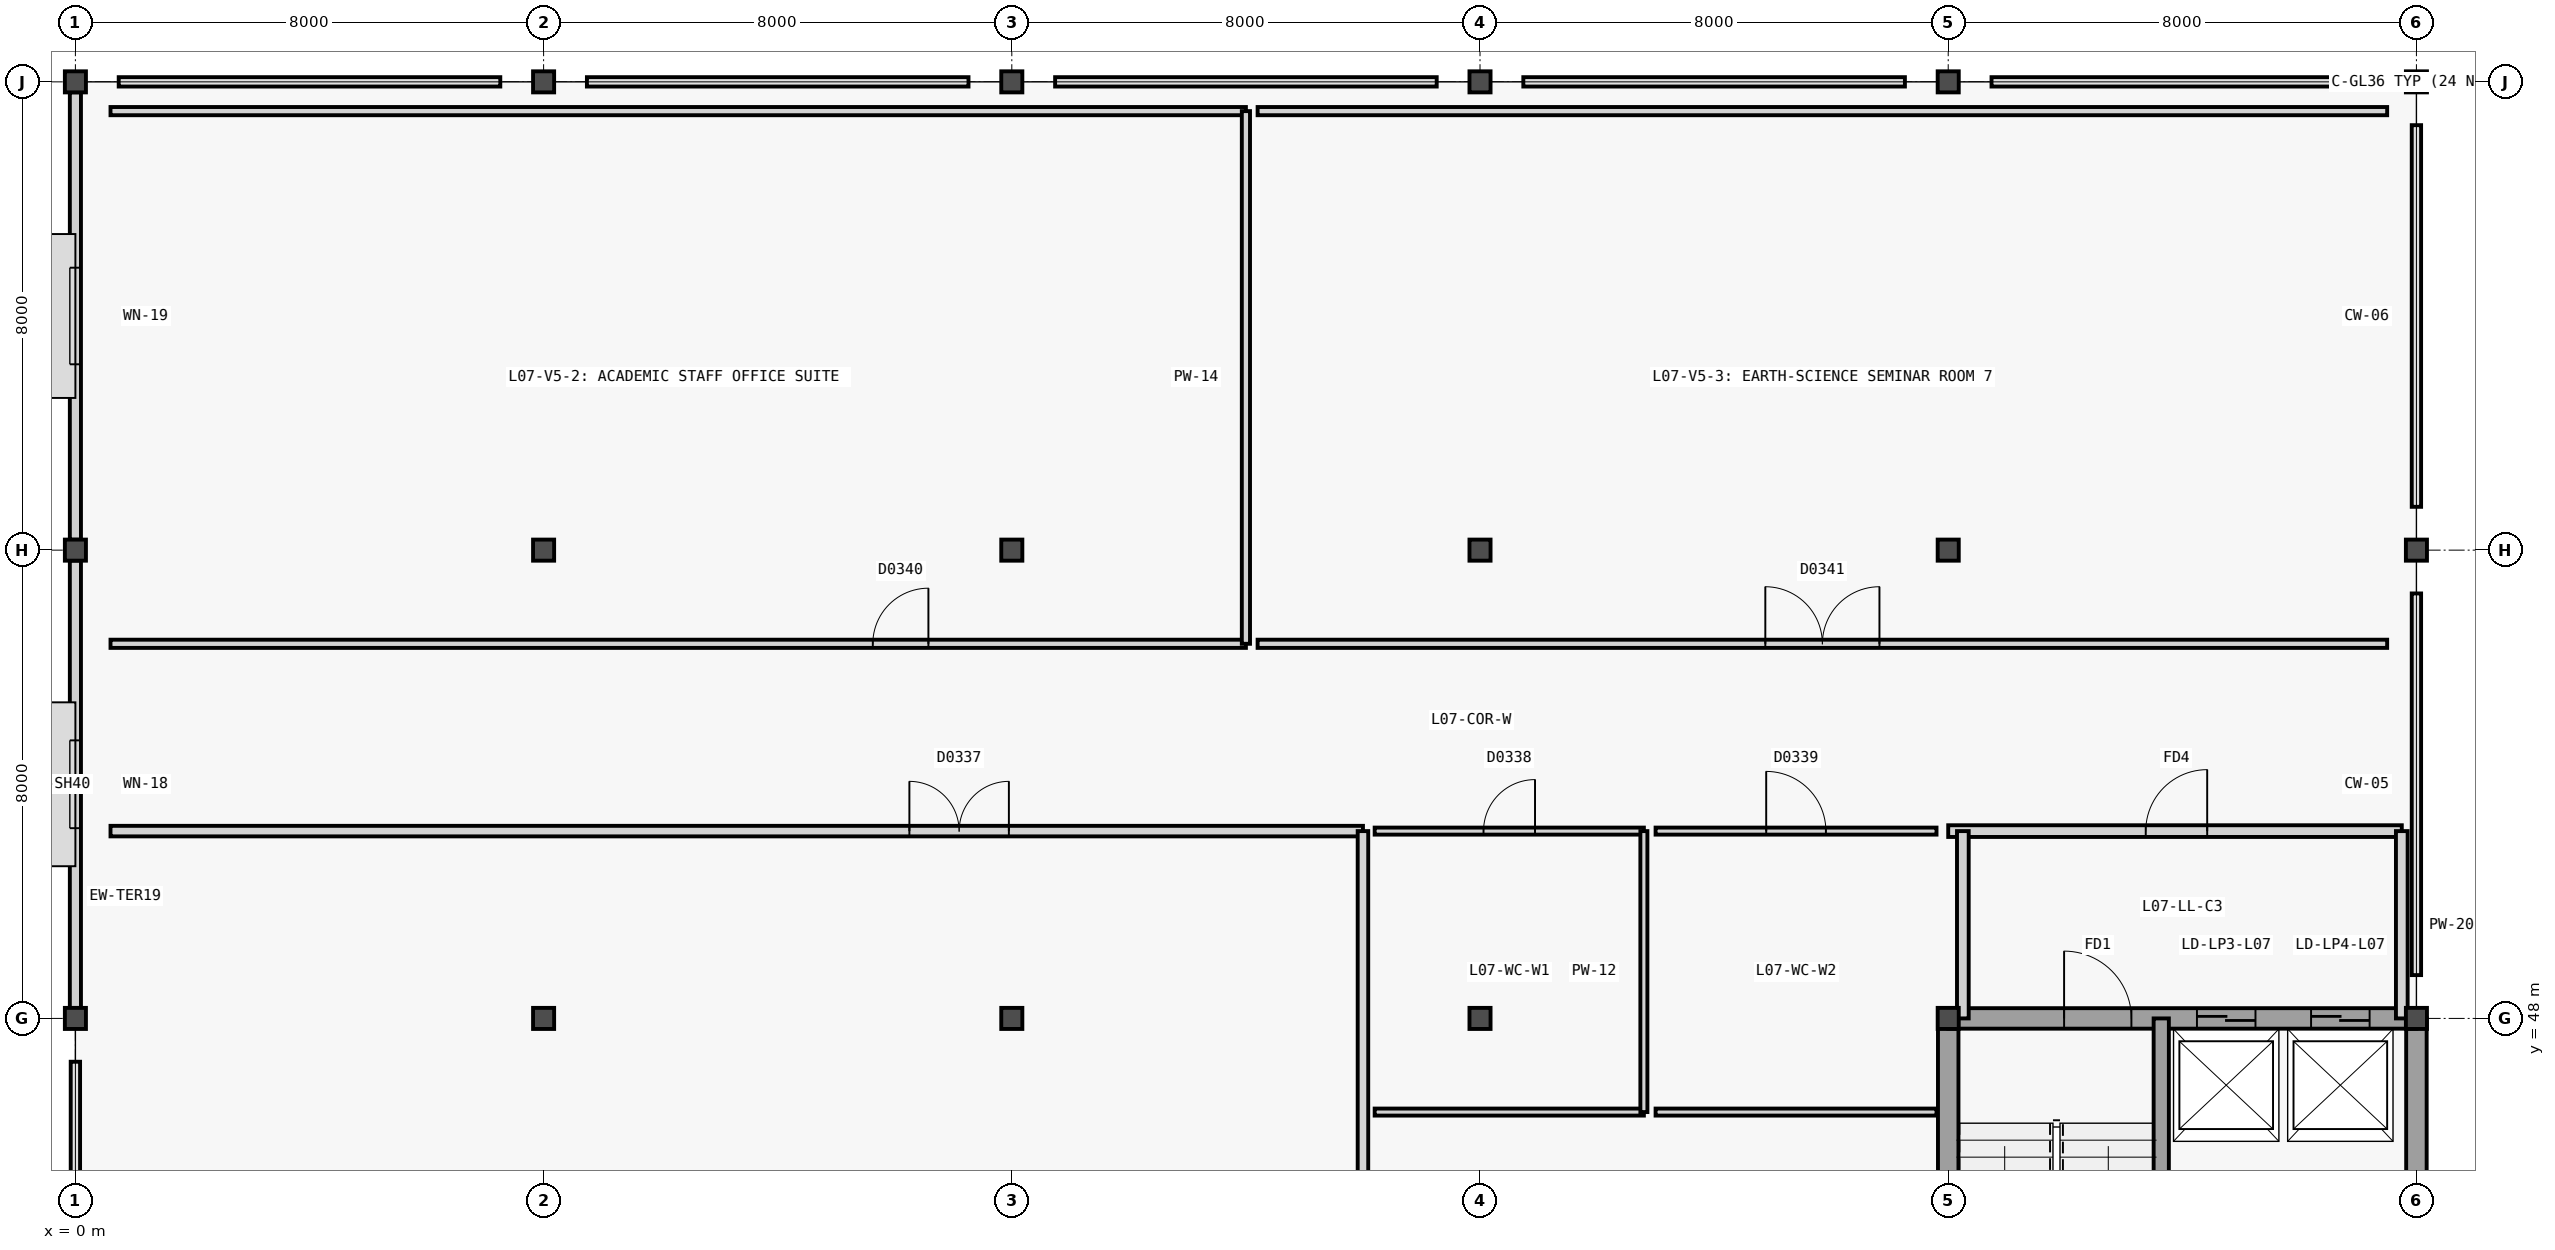
"""IFC4 building model, lengths in metres.
Left out: names, types, materials, properties, quantities, classifications, styles, units other than length and angle.
Written with IfcOpenShell. Run it as: python <this file> out.ifc"""

import sys

from ifc_helpers import new_model, si_unit, direction, frame, frame_2d, origin, origin_2d, place, context, subcontext, project, spatial, rectangle, extrude, element, fill, save


model = new_model("IFC4")
c1 = context("Model", 3, precision=1e-05, world=origin(), true_north=direction((0.0, 1.0)))
c2 = subcontext(c1, "Body", "Model", "MODEL_VIEW")
j1 = project(units=[si_unit("LENGTHUNIT", "METRE"), si_unit("PLANEANGLEUNIT", "RADIAN")], contexts=[c1])
p1 = place(None, origin())
s1 = spatial("IfcSite", under=j1, at=p1, CompositionType="ELEMENT")
p2 = place(p1, origin())
s2 = spatial("IfcBuilding", under=s1, at=p2, CompositionType="ELEMENT")
p3 = place(p2, frame((0.0, 0.0, 28.8)))
s3 = spatial("IfcBuildingStorey", under=s2, at=p3, CompositionType="ELEMENT", Elevation=28.8)
for number, where, z_axis, x_axis in (
    (1, (0.0, 48.0, 0.0), (0.0, 0.0, 1.0), (1.0, 0.0, 0.0)),
    (2, (0.0, 56.0, 0.0), (0.0, 0.0, 1.0), (1.0, 0.0, 0.0)),
    (3, (0.0, 64.0, 0.0), (0.0, 0.0, 1.0), (1.0, 0.0, 0.0)),
    (4, (8.0, 48.0, 0.0), (0.0, 0.0, 1.0), (1.0, 0.0, 0.0)),
    (5, (8.0, 56.0, 0.0), (0.0, 0.0, 1.0), (1.0, 0.0, 0.0)),
    (6, (8.0, 64.0, 0.0), (0.0, 0.0, 1.0), (1.0, 0.0, 0.0)),
    (7, (16.0, 48.0, 0.0), (0.0, 0.0, 1.0), (1.0, 0.0, 0.0)),
    (8, (16.0, 56.0, 0.0), (0.0, 0.0, 1.0), (1.0, 0.0, 0.0)),
    (9, (16.0, 64.0, 0.0), (0.0, 0.0, 1.0), (1.0, 0.0, 0.0)),
    (10, (24.0, 48.0, 0.0), (0.0, 0.0, 1.0), (1.0, 0.0, 0.0)),
    (11, (24.0, 56.0, 0.0), (0.0, 0.0, 1.0), (1.0, 0.0, 0.0)),
    (12, (24.0, 64.0, 0.0), (0.0, 0.0, 1.0), (1.0, 0.0, 0.0)),
    (13, (32.0, 48.0, 0.0), (0.0, 0.0, 1.0), (1.0, 0.0, 0.0)),
    (14, (32.0, 56.0, 0.0), (0.0, 0.0, 1.0), (1.0, 0.0, 0.0)),
    (15, (32.0, 64.0, 0.0), (0.0, 0.0, 1.0), (1.0, 0.0, 0.0)),
    (16, (40.0, 48.0, 0.0), (0.0, 0.0, 1.0), (1.0, 0.0, 0.0)),
    (17, (40.0, 56.0, 0.0), (0.0, 0.0, 1.0), (1.0, 0.0, 0.0)),
    (18, (40.0, 64.0, 0.0), (0.0, 0.0, 1.0), (1.0, 0.0, 0.0)),
):
    element("IfcColumn", number, at=place(p3, frame(where, z_axis=z_axis, x_axis=x_axis)), inside=s3, PredefinedType="COLUMN", context=c2, shape_type="SweptSolid", body=[
        extrude(rectangle(XDim=0.36, YDim=0.36, at=origin_2d()), origin(), (0.0, 0.0, 1.0), 3.34),
    ])
p4 = place(p3, frame((0.0, 48.178, 0.0), z_axis=(0.0, 0.0, 1.0), x_axis=(0.0, 1.0, 0.0)))
e19 = element("IfcWall", 19, at=p4, inside=s3, PredefinedType="SOLIDWALL", context=c2, shape_type="SweptSolid", body=[
    extrude(rectangle(XDim=7.644, YDim=0.19, at=frame_2d((3.822, 0.0))), origin(), (0.0, 0.0, 1.0), 2.74),
])
p5 = place(p4, frame((3.072, 0.0, 0.88)))
e20 = element("IfcOpeningElement", 20, at=p5, cuts=e19, PredefinedType="OPENING", context=c2, shape_type="SweptSolid", body=[
    extrude(rectangle(XDim=1.5, YDim=1.5, at=frame_2d((0.75, 0.75))), frame((0.0, 0.105, 0.0), z_axis=(0.0, -1.0, 0.0), x_axis=(1.0, 0.0, 0.0)), (0.0, 0.0, 1.0), 0.21),
])
p6 = place(p3, frame((0.0, 56.178, 0.0), z_axis=(0.0, 0.0, 1.0), x_axis=(0.0, 1.0, 0.0)))
e21 = element("IfcWall", 21, at=p6, inside=s3, PredefinedType="SOLIDWALL", context=c2, shape_type="SweptSolid", body=[
    extrude(rectangle(XDim=7.644, YDim=0.19, at=frame_2d((3.822, 0.0))), origin(), (0.0, 0.0, 1.0), 2.74),
])
p7 = place(p6, frame((2.997, 0.0, 0.88)))
e22 = element("IfcOpeningElement", 22, at=p7, cuts=e21, PredefinedType="OPENING", context=c2, shape_type="SweptSolid", body=[
    extrude(rectangle(XDim=1.65, YDim=1.5, at=frame_2d((0.825, 0.75))), frame((0.0, 0.105, 0.0), z_axis=(0.0, -1.0, 0.0), x_axis=(1.0, 0.0, 0.0)), (0.0, 0.0, 1.0), 0.21),
])
for number, where, z_axis, x_axis in (
    (23, (32.0, 40.0, 0.0), (0.0, 0.0, 1.0), (0.0, 1.0, 0.0)),
    (24, (40.0, 40.0, 0.0), (0.0, 0.0, 1.0), (0.0, 1.0, 0.0)),
):
    element("IfcWall", number, at=place(p3, frame(where, z_axis=z_axis, x_axis=x_axis)), inside=s3, PredefinedType="SHEAR", context=c2, shape_type="SweptSolid", body=[
        extrude(rectangle(XDim=8.0, YDim=0.35, at=frame_2d((4.0, 0.0))), origin(), (0.0, 0.0, 1.0), 3.6),
    ])
p8 = place(p3, frame((32.0, 48.0, 0.0), z_axis=(0.0, 0.0, 1.0), x_axis=(1.0, 0.0, 0.0)))
e25 = element("IfcWall", 25, at=p8, inside=s3, PredefinedType="SHEAR", context=c2, shape_type="SweptSolid", body=[
    extrude(rectangle(XDim=8.0, YDim=0.35, at=frame_2d((4.0, 0.0))), origin(), (0.0, 0.0, 1.0), 3.6),
])
p9 = place(p8, frame((1.98, 0.0, 0.0)))
e26 = element("IfcOpeningElement", 26, at=p9, cuts=e25, PredefinedType="OPENING", context=c2, shape_type="SweptSolid", body=[
    extrude(rectangle(XDim=1.15, YDim=2.2, at=frame_2d((0.575, 1.1))), frame((0.0, 0.185, 0.0), z_axis=(0.0, -1.0, 0.0), x_axis=(1.0, 0.0, 0.0)), (0.0, 0.0, 1.0), 0.37),
])
p10 = place(p8, frame((4.25, 0.0, 0.0)))
e27 = element("IfcOpeningElement", 27, at=p10, cuts=e25, PredefinedType="OPENING", context=c2, shape_type="SweptSolid", body=[
    extrude(rectangle(XDim=1.0, YDim=2.15, at=frame_2d((0.5, 1.075))), frame((0.0, 0.185, 0.0), z_axis=(0.0, -1.0, 0.0), x_axis=(1.0, 0.0, 0.0)), (0.0, 0.0, 1.0), 0.37),
])
p11 = place(p8, frame((6.2, 0.0, 0.0)))
e28 = element("IfcOpeningElement", 28, at=p11, cuts=e25, PredefinedType="OPENING", context=c2, shape_type="SweptSolid", body=[
    extrude(rectangle(XDim=1.0, YDim=2.15, at=frame_2d((0.5, 1.075))), frame((0.0, 0.185, 0.0), z_axis=(0.0, -1.0, 0.0), x_axis=(1.0, 0.0, 0.0)), (0.0, 0.0, 1.0), 0.37),
])
p12 = place(p3, frame((35.64, 40.0, 0.0), z_axis=(0.0, 0.0, 1.0), x_axis=(0.0, 1.0, 0.0)))
e29 = element("IfcWall", 29, at=p12, inside=s3, PredefinedType="SHEAR", context=c2, shape_type="SweptSolid", body=[
    extrude(rectangle(XDim=8.0, YDim=0.26, at=frame_2d((4.0, 0.0))), origin(), (0.0, 0.0, 1.0), 3.6),
])
p13 = place(p3, frame((32.0, 51.2, 0.0), z_axis=(0.0, 0.0, 1.0), x_axis=(1.0, 0.0, 0.0)))
e30 = element("IfcWall", 30, at=p13, inside=s3, PredefinedType="PARTITIONING", context=c2, shape_type="SweptSolid", body=[
    extrude(rectangle(XDim=7.75, YDim=0.2, at=frame_2d((3.875, 0.0))), origin(), (0.0, 0.0, 1.0), 3.32),
])
p14 = place(p13, frame((3.375, 0.0, 0.0)))
e31 = element("IfcOpeningElement", 31, at=p14, cuts=e30, PredefinedType="OPENING", context=c2, shape_type="SweptSolid", body=[
    extrude(rectangle(XDim=1.05, YDim=2.15, at=frame_2d((0.525, 1.075))), frame((0.0, 0.11, 0.0), z_axis=(0.0, -1.0, 0.0), x_axis=(1.0, 0.0, 0.0)), (0.0, 0.0, 1.0), 0.22),
])
p15 = place(p3, frame((39.75, 48.0, 0.0), z_axis=(0.0, 0.0, 1.0), x_axis=(0.0, 1.0, 0.0)))
e32 = element("IfcWall", 32, at=p15, inside=s3, PredefinedType="PARTITIONING", context=c2, shape_type="SweptSolid", body=[
    extrude(rectangle(XDim=3.2, YDim=0.2, at=frame_2d((1.6, 0.0))), origin(), (0.0, 0.0, 1.0), 2.74),
])
p16 = place(p3, frame((32.25, 48.0, 0.0), z_axis=(0.0, 0.0, 1.0), x_axis=(0.0, 1.0, 0.0)))
e33 = element("IfcWall", 33, at=p16, inside=s3, PredefinedType="PARTITIONING", context=c2, shape_type="SweptSolid", body=[
    extrude(rectangle(XDim=3.2, YDim=0.2, at=frame_2d((1.6, 0.0))), origin(), (0.0, 0.0, 1.0), 2.78),
])
p17 = place(p3, frame((0.6, 51.2, 0.0), z_axis=(0.0, 0.0, 1.0), x_axis=(1.0, 0.0, 0.0)))
e34 = element("IfcWall", 34, at=p17, inside=s3, PredefinedType="PARTITIONING", context=c2, shape_type="SweptSolid", body=[
    extrude(rectangle(XDim=21.4, YDim=0.18, at=frame_2d((10.7, 0.0))), origin(), (0.0, 0.0, 1.0), 3.34),
])
p18 = place(p17, frame((13.65, 0.0, 0.0)))
e35 = element("IfcOpeningElement", 35, at=p18, cuts=e34, PredefinedType="OPENING", context=c2, shape_type="SweptSolid", body=[
    extrude(rectangle(XDim=1.7, YDim=2.25, at=frame_2d((0.85, 1.125))), frame((0.0, 0.1, 0.0), z_axis=(0.0, -1.0, 0.0), x_axis=(1.0, 0.0, 0.0)), (0.0, 0.0, 1.0), 0.2),
])
p19 = place(p3, frame((22.0, 33.8, 0.0), z_axis=(0.0, 0.0, 1.0), x_axis=(0.0, 1.0, 0.0)))
e36 = element("IfcWall", 36, at=p19, inside=s3, PredefinedType="PARTITIONING", context=c2, shape_type="SweptSolid", body=[
    extrude(rectangle(XDim=17.4, YDim=0.18, at=frame_2d((8.7, 0.0))), origin(), (0.0, 0.0, 1.0), 3.34),
])
p20 = place(p3, frame((22.2, 46.4, 0.0), z_axis=(0.0, 0.0, 1.0), x_axis=(1.0, 0.0, 0.0)))
e37 = element("IfcWall", 37, at=p20, inside=s3, PredefinedType="PARTITIONING", context=c2, shape_type="SweptSolid", body=[
    extrude(rectangle(XDim=4.6, YDim=0.12, at=frame_2d((2.3, 0.0))), origin(), (0.0, 0.0, 1.0), 3.34),
])
p21 = place(p3, frame((22.2, 51.2, 0.0), z_axis=(0.0, 0.0, 1.0), x_axis=(1.0, 0.0, 0.0)))
e38 = element("IfcWall", 38, at=p21, inside=s3, PredefinedType="PARTITIONING", context=c2, shape_type="SweptSolid", body=[
    extrude(rectangle(XDim=4.6, YDim=0.12, at=frame_2d((2.3, 0.0))), origin(), (0.0, 0.0, 1.0), 3.34),
])
p22 = place(p21, frame((1.86, 0.0, 0.0)))
e39 = element("IfcOpeningElement", 39, at=p22, cuts=e38, PredefinedType="OPENING", context=c2, shape_type="SweptSolid", body=[
    extrude(rectangle(XDim=0.88, YDim=2.1, at=frame_2d((0.44, 1.05))), frame((0.0, 0.07, 0.0), z_axis=(0.0, -1.0, 0.0), x_axis=(1.0, 0.0, 0.0)), (0.0, 0.0, 1.0), 0.14),
])
for number, where, z_axis, x_axis in (
    (40, (26.8, 46.4, 0.0), (0.0, 0.0, 1.0), (0.0, 1.0, 0.0)),
    (41, (27.0, 46.4, 0.0), (0.0, 0.0, 1.0), (1.0, 0.0, 0.0)),
):
    element("IfcWall", number, at=place(p3, frame(where, z_axis=z_axis, x_axis=x_axis)), inside=s3, PredefinedType="PARTITIONING", context=c2, shape_type="SweptSolid", body=[
        extrude(rectangle(XDim=4.8, YDim=0.12, at=frame_2d((2.4, 0.0))), origin(), (0.0, 0.0, 1.0), 3.34),
    ])
p23 = place(p3, frame((27.0, 51.2, 0.0), z_axis=(0.0, 0.0, 1.0), x_axis=(1.0, 0.0, 0.0)))
e42 = element("IfcWall", 42, at=p23, inside=s3, PredefinedType="PARTITIONING", context=c2, shape_type="SweptSolid", body=[
    extrude(rectangle(XDim=4.8, YDim=0.12, at=frame_2d((2.4, 0.0))), origin(), (0.0, 0.0, 1.0), 3.34),
])
p24 = place(p23, frame((1.89, 0.0, 0.0)))
e43 = element("IfcOpeningElement", 43, at=p24, cuts=e42, PredefinedType="OPENING", context=c2, shape_type="SweptSolid", body=[
    extrude(rectangle(XDim=1.02, YDim=2.1, at=frame_2d((0.51, 1.05))), frame((0.0, 0.07, 0.0), z_axis=(0.0, -1.0, 0.0), x_axis=(1.0, 0.0, 0.0)), (0.0, 0.0, 1.0), 0.14),
])
p25 = place(p3, frame((0.6, 54.4, 0.0), z_axis=(0.0, 0.0, 1.0), x_axis=(1.0, 0.0, 0.0)))
e44 = element("IfcWall", 44, at=p25, inside=s3, PredefinedType="PARTITIONING", context=c2, shape_type="SweptSolid", body=[
    extrude(rectangle(XDim=19.4, YDim=0.14, at=frame_2d((9.7, 0.0))), origin(), (0.0, 0.0, 1.0), 3.34),
])
p26 = place(p25, frame((13.025, 0.0, 0.0)))
e45 = element("IfcOpeningElement", 45, at=p26, cuts=e44, PredefinedType="OPENING", context=c2, shape_type="SweptSolid", body=[
    extrude(rectangle(XDim=0.95, YDim=2.1, at=frame_2d((0.475, 1.05))), frame((0.0, 0.08, 0.0), z_axis=(0.0, -1.0, 0.0), x_axis=(1.0, 0.0, 0.0)), (0.0, 0.0, 1.0), 0.16),
])
p27 = place(p3, frame((0.6, 63.5, 0.0), z_axis=(0.0, 0.0, 1.0), x_axis=(1.0, 0.0, 0.0)))
e46 = element("IfcWall", 46, at=p27, inside=s3, PredefinedType="PARTITIONING", context=c2, shape_type="SweptSolid", body=[
    extrude(rectangle(XDim=19.4, YDim=0.14, at=frame_2d((9.7, 0.0))), origin(), (0.0, 0.0, 1.0), 3.34),
])
p28 = place(p3, frame((20.0, 54.4, 0.0), z_axis=(0.0, 0.0, 1.0), x_axis=(0.0, 1.0, 0.0)))
e47 = element("IfcWall", 47, at=p28, inside=s3, PredefinedType="PARTITIONING", context=c2, shape_type="SweptSolid", body=[
    extrude(rectangle(XDim=9.1, YDim=0.14, at=frame_2d((4.55, 0.0))), origin(), (0.0, 0.0, 1.0), 2.94),
])
p29 = place(p3, frame((20.2, 54.4, 0.0), z_axis=(0.0, 0.0, 1.0), x_axis=(1.0, 0.0, 0.0)))
e48 = element("IfcWall", 48, at=p29, inside=s3, PredefinedType="PARTITIONING", context=c2, shape_type="SweptSolid", body=[
    extrude(rectangle(XDim=19.3, YDim=0.14, at=frame_2d((9.65, 0.0))), origin(), (0.0, 0.0, 1.0), 3.34),
])
p30 = place(p29, frame((8.675, 0.0, 0.0)))
e49 = element("IfcOpeningElement", 49, at=p30, cuts=e48, PredefinedType="OPENING", context=c2, shape_type="SweptSolid", body=[
    extrude(rectangle(XDim=1.95, YDim=2.35, at=frame_2d((0.975, 1.175))), frame((0.0, 0.08, 0.0), z_axis=(0.0, -1.0, 0.0), x_axis=(1.0, 0.0, 0.0)), (0.0, 0.0, 1.0), 0.16),
])
p31 = place(p3, frame((20.2, 63.5, 0.0), z_axis=(0.0, 0.0, 1.0), x_axis=(1.0, 0.0, 0.0)))
e50 = element("IfcWall", 50, at=p31, inside=s3, PredefinedType="PARTITIONING", context=c2, shape_type="SweptSolid", body=[
    extrude(rectangle(XDim=19.3, YDim=0.14, at=frame_2d((9.65, 0.0))), origin(), (0.0, 0.0, 1.0), 3.34),
])
p32 = place(p5, origin())
e51 = element("IfcWindow", 51, at=p32, inside=s3, PartitioningType="SINGLE_PANEL", PredefinedType="WINDOW", context=c2, shape_type="SweptSolid", body=[
    extrude(rectangle(XDim=1.5, YDim=1.5, at=frame_2d((0.75, 0.75))), frame((0.0, 0.03, 0.0), z_axis=(0.0, -1.0, 0.0), x_axis=(1.0, 0.0, 0.0)), (0.0, 0.0, 1.0), 0.06),
])
fill(e20, e51)
p33 = place(p7, origin())
e52 = element("IfcWindow", 52, at=p33, inside=s3, PartitioningType="SINGLE_PANEL", PredefinedType="WINDOW", context=c2, shape_type="SweptSolid", body=[
    extrude(rectangle(XDim=1.65, YDim=1.5, at=frame_2d((0.825, 0.75))), frame((0.0, 0.03, 0.0), z_axis=(0.0, -1.0, 0.0), x_axis=(1.0, 0.0, 0.0)), (0.0, 0.0, 1.0), 0.06),
])
fill(e22, e52)
p34 = place(p9, origin())
e53 = element("IfcDoor", 53, at=p34, inside=s3, OperationType="SINGLE_SWING_LEFT", PredefinedType="DOOR", context=c2, shape_type="SweptSolid", body=[
    extrude(rectangle(XDim=1.15, YDim=2.2, at=frame_2d((0.575, 1.1))), frame((0.0, 0.025, 0.0), z_axis=(0.0, -1.0, 0.0), x_axis=(1.0, 0.0, 0.0)), (0.0, 0.0, 1.0), 0.05),
])
fill(e26, e53)
p35 = place(p10, origin())
e54 = element("IfcDoor", 54, at=p35, inside=s3, OperationType="DOUBLE_DOOR_SLIDING", PredefinedType="DOOR", context=c2, shape_type="SweptSolid", body=[
    extrude(rectangle(XDim=1.0, YDim=2.15, at=frame_2d((0.5, 1.075))), frame((0.0, 0.025, 0.0), z_axis=(0.0, -1.0, 0.0), x_axis=(1.0, 0.0, 0.0)), (0.0, 0.0, 1.0), 0.05),
])
fill(e27, e54)
p36 = place(p11, origin())
e55 = element("IfcDoor", 55, at=p36, inside=s3, OperationType="DOUBLE_DOOR_SLIDING", PredefinedType="DOOR", context=c2, shape_type="SweptSolid", body=[
    extrude(rectangle(XDim=1.0, YDim=2.15, at=frame_2d((0.5, 1.075))), frame((0.0, 0.025, 0.0), z_axis=(0.0, -1.0, 0.0), x_axis=(1.0, 0.0, 0.0)), (0.0, 0.0, 1.0), 0.05),
])
fill(e28, e55)
p37 = place(p14, origin())
e56 = element("IfcDoor", 56, at=p37, inside=s3, OperationType="SINGLE_SWING_RIGHT", PredefinedType="DOOR", context=c2, shape_type="SweptSolid", body=[
    extrude(rectangle(XDim=1.05, YDim=2.15, at=frame_2d((0.525, 1.075))), frame((0.0, 0.025, 0.0), z_axis=(0.0, -1.0, 0.0), x_axis=(1.0, 0.0, 0.0)), (0.0, 0.0, 1.0), 0.05),
])
fill(e31, e56)
p38 = place(p18, origin())
e57 = element("IfcDoor", 57, at=p38, inside=s3, OperationType="DOUBLE_DOOR_SINGLE_SWING", PredefinedType="DOOR", context=c2, shape_type="SweptSolid", body=[
    extrude(rectangle(XDim=1.7, YDim=2.25, at=frame_2d((0.85, 1.125))), frame((0.0, 0.025, 0.0), z_axis=(0.0, -1.0, 0.0), x_axis=(1.0, 0.0, 0.0)), (0.0, 0.0, 1.0), 0.05),
])
fill(e35, e57)
p39 = place(p22, origin())
e58 = element("IfcDoor", 58, at=p39, inside=s3, OperationType="SINGLE_SWING_RIGHT", PredefinedType="DOOR", context=c2, shape_type="SweptSolid", body=[
    extrude(rectangle(XDim=0.88, YDim=2.1, at=frame_2d((0.44, 1.05))), frame((0.0, 0.025, 0.0), z_axis=(0.0, -1.0, 0.0), x_axis=(1.0, 0.0, 0.0)), (0.0, 0.0, 1.0), 0.05),
])
fill(e39, e58)
p40 = place(p24, origin())
e59 = element("IfcDoor", 59, at=p40, inside=s3, OperationType="SINGLE_SWING_LEFT", PredefinedType="DOOR", context=c2, shape_type="SweptSolid", body=[
    extrude(rectangle(XDim=1.02, YDim=2.1, at=frame_2d((0.51, 1.05))), frame((0.0, 0.025, 0.0), z_axis=(0.0, -1.0, 0.0), x_axis=(1.0, 0.0, 0.0)), (0.0, 0.0, 1.0), 0.05),
])
fill(e43, e59)
p41 = place(p26, origin())
e60 = element("IfcDoor", 60, at=p41, inside=s3, OperationType="SINGLE_SWING_RIGHT", PredefinedType="DOOR", context=c2, shape_type="SweptSolid", body=[
    extrude(rectangle(XDim=0.95, YDim=2.1, at=frame_2d((0.475, 1.05))), frame((0.0, 0.025, 0.0), z_axis=(0.0, -1.0, 0.0), x_axis=(1.0, 0.0, 0.0)), (0.0, 0.0, 1.0), 0.05),
])
fill(e45, e60)
p42 = place(p30, origin())
e61 = element("IfcDoor", 61, at=p42, inside=s3, OperationType="DOUBLE_DOOR_SINGLE_SWING", PredefinedType="DOOR", context=c2, shape_type="SweptSolid", body=[
    extrude(rectangle(XDim=1.95, YDim=2.35, at=frame_2d((0.975, 1.175))), frame((0.0, 0.025, 0.0), z_axis=(0.0, -1.0, 0.0), x_axis=(1.0, 0.0, 0.0)), (0.0, 0.0, 1.0), 0.05),
])
fill(e49, e61)
save(model, sys.argv[1])
